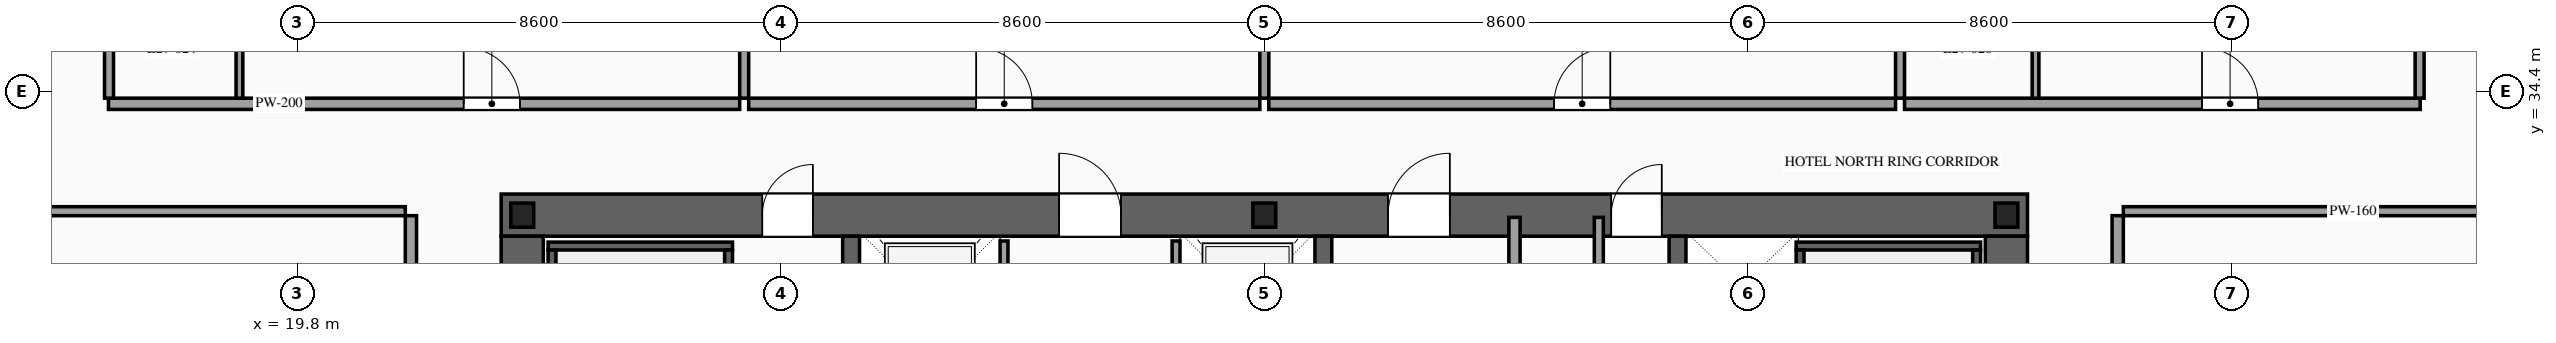
"""IFC4 building model, lengths in metres.
Left out: names, types, materials, properties, quantities, classifications, styles, units other than length and angle.
Written with IfcOpenShell. Run it as: python <this file> out.ifc"""

import sys

from ifc_helpers import new_model, si_unit, direction, frame, frame_2d, origin, origin_2d, place, context, subcontext, project, spatial, rectangle, i_section, extrude, source, transform, mapped, element, fill, save


model = new_model("IFC4")
c1 = context("Model", 3, precision=1e-05, world=origin(), true_north=direction((0.0, 1.0)))
c2 = subcontext(c1, "Body", "Model", "MODEL_VIEW")
j1 = project(units=[si_unit("LENGTHUNIT", "METRE"), si_unit("PLANEANGLEUNIT", "RADIAN")], contexts=[c1])
p1 = place(None, origin())
s1 = spatial("IfcSite", under=j1, at=p1, CompositionType="ELEMENT")
p2 = place(p1, origin())
s2 = spatial("IfcBuilding", under=s1, at=p2, CompositionType="ELEMENT")
p3 = place(p2, frame((0.0, 0.0, 104.6)))
s3 = spatial("IfcBuildingStorey", under=s2, at=p3, CompositionType="ELEMENT", Elevation=104.6)
p4 = place(p3, frame((23.425, 32.2, 0.0), z_axis=(0.0, 0.0, 1.0), x_axis=(1.0, 0.0, 0.0)))
e1 = element("IfcWall", 1, at=p4, inside=s3, PredefinedType="SHEAR", context=c2, shape_type="SweptSolid", body=[
    extrude(rectangle(XDim=27.15, YDim=0.75, at=frame_2d((13.575, 0.0))), origin(), (0.0, 0.0, 1.0), 3.6),
])
p5 = place(p4, frame((4.645, 0.0, 0.0)))
e2 = element("IfcOpeningElement", 2, at=p5, cuts=e1, PredefinedType="OPENING", context=c2, shape_type="SweptSolid", body=[
    extrude(rectangle(XDim=0.9, YDim=2.15, at=frame_2d((0.45, 1.075))), frame((0.0, 0.39, 0.0), z_axis=(0.0, -1.0, 0.0), x_axis=(1.0, 0.0, 0.0)), (0.0, 0.0, 1.0), 0.78),
])
p6 = place(p4, frame((9.925, 0.0, 0.0)))
e3 = element("IfcOpeningElement", 3, at=p6, cuts=e1, PredefinedType="OPENING", context=c2, shape_type="SweptSolid", body=[
    extrude(rectangle(XDim=1.1, YDim=2.2, at=frame_2d((0.55, 1.1))), frame((0.0, 0.39, 0.0), z_axis=(0.0, -1.0, 0.0), x_axis=(1.0, 0.0, 0.0)), (0.0, 0.0, 1.0), 0.78),
])
p7 = place(p4, frame((15.775, 0.0, 0.0)))
e4 = element("IfcOpeningElement", 4, at=p7, cuts=e1, PredefinedType="OPENING", context=c2, shape_type="SweptSolid", body=[
    extrude(rectangle(XDim=1.1, YDim=2.2, at=frame_2d((0.55, 1.1))), frame((0.0, 0.39, 0.0), z_axis=(0.0, -1.0, 0.0), x_axis=(1.0, 0.0, 0.0)), (0.0, 0.0, 1.0), 0.78),
])
p8 = place(p4, frame((19.745, 0.0, 0.0)))
e5 = element("IfcOpeningElement", 5, at=p8, cuts=e1, PredefinedType="OPENING", context=c2, shape_type="SweptSolid", body=[
    extrude(rectangle(XDim=0.9, YDim=2.15, at=frame_2d((0.45, 1.075))), frame((0.0, 0.39, 0.0), z_axis=(0.0, -1.0, 0.0), x_axis=(1.0, 0.0, 0.0)), (0.0, 0.0, 1.0), 0.78),
])
m1 = source(origin(), c2, "Body", "SweptSolid", [
    extrude(rectangle(XDim=12.05, YDim=0.75, at=frame_2d((6.025, 0.0))), origin(), (0.0, 0.0, 1.0), 3.6),
])
for number, where, z_axis, x_axis in (
    (6, (23.8, 19.775, 0.0), (0.0, 0.0, 1.0), (0.0, 1.0, 0.0)),
    (7, (50.2, 19.775, 0.0), (0.0, 0.0, 1.0), (0.0, 1.0, 0.0)),
):
    element("IfcWall", number, at=place(p3, frame(where, z_axis=z_axis, x_axis=x_axis)), inside=s3, PredefinedType="SHEAR", context=c2, shape_type="MappedRepresentation", body=[
        mapped(m1, transform((0.0, 0.0, 0.0), scale=1.0)),
    ])
m2 = source(origin(), c2, "Body", "SweptSolid", [
    extrude(rectangle(XDim=12.05, YDim=0.3, at=frame_2d((6.025, 0.0))), origin(), (0.0, 0.0, 1.0), 3.6),
])
for number, where, z_axis, x_axis in (
    (8, (29.65, 19.775, 0.0), (0.0, 0.0, 1.0), (0.0, 1.0, 0.0)),
    (9, (38.05, 19.775, 0.0), (0.0, 0.0, 1.0), (0.0, 1.0, 0.0)),
    (10, (44.35, 19.775, 0.0), (0.0, 0.0, 1.0), (0.0, 1.0, 0.0)),
):
    element("IfcWall", number, at=place(p3, frame(where, z_axis=z_axis, x_axis=x_axis)), inside=s3, PredefinedType="SOLIDWALL", context=c2, shape_type="MappedRepresentation", body=[
        mapped(m2, transform((0.0, 0.0, 0.0), scale=1.0)),
    ])
m3 = source(origin(), c2, "Body", "SweptSolid", [
    extrude(i_section(OverallWidth=0.407, OverallDepth=0.428, WebThickness=0.02, FlangeThickness=0.035, at=origin_2d()), origin(), (0.0, 0.0, 1.0), 3.6),
])
for number, where, z_axis, x_axis in (
    (11, (23.8, 32.2, 0.0), (0.0, 0.0, 1.0), (1.0, 0.0, 0.0)),
    (12, (37.0, 32.2, 0.0), (0.0, 0.0, 1.0), (1.0, 0.0, 0.0)),
    (13, (50.2, 32.2, 0.0), (0.0, 0.0, 1.0), (1.0, 0.0, 0.0)),
):
    element("IfcColumn", number, at=place(p3, frame(where, z_axis=z_axis, x_axis=x_axis)), inside=s3, PredefinedType="COLUMN", context=c2, shape_type="MappedRepresentation", body=[
        mapped(m3, transform((0.0, 0.0, 0.0), scale=1.0)),
    ])
p9 = place(p3, frame((32.37, 29.4, 0.0), z_axis=(0.0, 0.0, 1.0), x_axis=(0.0, 1.0, 0.0)))
e14 = element("IfcWall", 14, at=p9, inside=s3, PredefinedType="SOLIDWALL", context=c2, shape_type="SweptSolid", body=[
    extrude(rectangle(XDim=2.34, YDim=0.14, at=frame_2d((1.17, 0.0))), origin(), (0.0, 0.0, 1.0), 3.38),
])
p10 = place(p9, frame((0.62, 0.0, 0.0)))
e15 = element("IfcOpeningElement", 15, at=p10, cuts=e14, PredefinedType="OPENING", context=c2, shape_type="SweptSolid", body=[
    extrude(rectangle(XDim=1.1, YDim=2.2, at=frame_2d((0.55, 1.1))), frame((0.0, 0.085, 0.0), z_axis=(0.0, -1.0, 0.0), x_axis=(1.0, 0.0, 0.0)), (0.0, 0.0, 1.0), 0.17),
])
p11 = place(p3, frame((35.43, 29.4, 0.0), z_axis=(0.0, 0.0, 1.0), x_axis=(0.0, 1.0, 0.0)))
e16 = element("IfcWall", 16, at=p11, inside=s3, PredefinedType="SOLIDWALL", context=c2, shape_type="SweptSolid", body=[
    extrude(rectangle(XDim=2.34, YDim=0.14, at=frame_2d((1.17, 0.0))), origin(), (0.0, 0.0, 1.0), 3.38),
])
p12 = place(p11, frame((0.62, 0.0, 0.0)))
e17 = element("IfcOpeningElement", 17, at=p12, cuts=e16, PredefinedType="OPENING", context=c2, shape_type="SweptSolid", body=[
    extrude(rectangle(XDim=1.1, YDim=2.2, at=frame_2d((0.55, 1.1))), frame((0.0, 0.085, 0.0), z_axis=(0.0, -1.0, 0.0), x_axis=(1.0, 0.0, 0.0)), (0.0, 0.0, 1.0), 0.17),
])
m4 = source(origin(), c2, "Body", "SweptSolid", [
    extrude(rectangle(XDim=3.28, YDim=0.14, at=frame_2d((1.64, 0.0))), origin(), (0.0, 0.0, 1.0), 3.38),
])
p13 = place(p3, frame((24.26, 31.65, 0.0), z_axis=(0.0, 0.0, 1.0), x_axis=(1.0, 0.0, 0.0)))
e18 = element("IfcWall", 18, at=p13, inside=s3, PredefinedType="SOLIDWALL", context=c2, shape_type="MappedRepresentation", body=[
    mapped(m4, transform((0.0, 0.0, 0.0), scale=1.0)),
])
m5 = source(origin(), c2, "Body", "SweptSolid", [
    extrude(rectangle(XDim=8.94, YDim=0.14, at=frame_2d((4.47, 0.0))), origin(), (0.0, 0.0, 1.0), 3.38),
])
for number, where, z_axis, x_axis in (
    (19, (24.33, 22.64, 0.0), (0.0, 0.0, 1.0), (0.0, 1.0, 0.0)),
    (20, (27.47, 22.64, 0.0), (0.0, 0.0, 1.0), (0.0, 1.0, 0.0)),
):
    element("IfcWall", number, at=place(p3, frame(where, z_axis=z_axis, x_axis=x_axis)), inside=s3, PredefinedType="SOLIDWALL", context=c2, shape_type="MappedRepresentation", body=[
        mapped(m5, transform((0.0, 0.0, 0.0), scale=1.0)),
    ])
p14 = place(p3, frame((46.46, 31.65, 0.0), z_axis=(0.0, 0.0, 1.0), x_axis=(1.0, 0.0, 0.0)))
e21 = element("IfcWall", 21, at=p14, inside=s3, PredefinedType="SOLIDWALL", context=c2, shape_type="MappedRepresentation", body=[
    mapped(m4, transform((0.0, 0.0, 0.0), scale=1.0)),
])
for number, where, z_axis, x_axis in (
    (22, (46.53, 22.64, 0.0), (0.0, 0.0, 1.0), (0.0, 1.0, 0.0)),
    (23, (49.67, 22.64, 0.0), (0.0, 0.0, 1.0), (0.0, 1.0, 0.0)),
):
    element("IfcWall", number, at=place(p3, frame(where, z_axis=z_axis, x_axis=x_axis)), inside=s3, PredefinedType="SOLIDWALL", context=c2, shape_type="MappedRepresentation", body=[
        mapped(m5, transform((0.0, 0.0, 0.0), scale=1.0)),
    ])
m6 = source(origin(), c2, "Body", "SweptSolid", [
    extrude(rectangle(XDim=12.72, YDim=0.2, at=frame_2d((6.36, 0.0))), origin(), (0.0, 0.0, 1.0), 3.38),
])
p15 = place(p3, frame((41.45, 19.44, 0.0), z_axis=(0.0, 0.0, 1.0), x_axis=(0.0, 1.0, 0.0)))
e24 = element("IfcWall", 24, at=p15, inside=s3, PredefinedType="PARTITIONING", context=c2, shape_type="MappedRepresentation", body=[
    mapped(m6, transform((0.0, 0.0, 0.0), scale=1.0)),
])
m7 = source(origin(), c2, "Body", "SweptSolid", [
    extrude(rectangle(XDim=10.72, YDim=0.16, at=frame_2d((5.36, 0.0))), origin(), (0.0, 0.0, 1.0), 3.38),
])
p16 = place(p3, frame((42.95, 21.44, 0.0), z_axis=(0.0, 0.0, 1.0), x_axis=(0.0, 1.0, 0.0)))
e25 = element("IfcWall", 25, at=p16, inside=s3, PredefinedType="PARTITIONING", context=c2, shape_type="MappedRepresentation", body=[
    mapped(m7, transform((0.0, 0.0, 0.0), scale=1.0)),
])
p17 = place(p3, frame((16.44, 34.18, 0.0), z_axis=(0.0, 0.0, 1.0), x_axis=(1.0, 0.0, 0.0)))
e26 = element("IfcWall", 26, at=p17, inside=s3, PredefinedType="PARTITIONING", context=c2, shape_type="SweptSolid", body=[
    extrude(rectangle(XDim=11.228, YDim=0.2, at=frame_2d((5.614, 0.0))), origin(), (0.0, 0.0, 1.0), 3.38),
])
p18 = place(p17, frame((6.319, 0.0, 0.0)))
e27 = element("IfcOpeningElement", 27, at=p18, cuts=e26, PredefinedType="OPENING", context=c2, shape_type="SweptSolid", body=[
    extrude(rectangle(XDim=1.0, YDim=2.2, at=frame_2d((0.5, 1.1))), frame((0.0, 0.115, 0.0), z_axis=(0.0, -1.0, 0.0), x_axis=(1.0, 0.0, 0.0)), (0.0, 0.0, 1.0), 0.23),
])
m8 = source(origin(), c2, "Body", "SweptSolid", [
    extrude(rectangle(XDim=14.97, YDim=0.16, at=frame_2d((7.485, 0.0))), origin(), (0.0, 0.0, 1.0), 3.38),
])
p19 = place(p3, frame((27.748, 34.28, 0.0), z_axis=(0.0, 0.0, 1.0), x_axis=(0.0, 1.0, 0.0)))
e28 = element("IfcWall", 28, at=p19, inside=s3, PredefinedType="PARTITIONING", context=c2, shape_type="MappedRepresentation", body=[
    mapped(m8, transform((0.0, 0.0, 0.0), scale=1.0)),
])
m9 = source(origin(), c2, "Body", "SweptSolid", [
    extrude(rectangle(XDim=2.42, YDim=0.12, at=frame_2d((1.21, 0.0))), origin(), (0.0, 0.0, 1.0), 3.38),
])
p20 = place(p3, frame((18.77, 34.28, 0.0), z_axis=(0.0, 0.0, 1.0), x_axis=(0.0, 1.0, 0.0)))
e29 = element("IfcWall", 29, at=p20, inside=s3, PredefinedType="PARTITIONING", context=c2, shape_type="MappedRepresentation", body=[
    mapped(m9, transform((0.0, 0.0, 0.0), scale=1.0)),
])
p21 = place(p3, frame((27.828, 34.18, 0.0), z_axis=(0.0, 0.0, 1.0), x_axis=(1.0, 0.0, 0.0)))
e30 = element("IfcWall", 30, at=p21, inside=s3, PredefinedType="PARTITIONING", context=c2, shape_type="SweptSolid", body=[
    extrude(rectangle(XDim=9.092, YDim=0.2, at=frame_2d((4.546, 0.0))), origin(), (0.0, 0.0, 1.0), 3.38),
])
p22 = place(p21, frame((4.046, 0.0, 0.0)))
e31 = element("IfcOpeningElement", 31, at=p22, cuts=e30, PredefinedType="OPENING", context=c2, shape_type="SweptSolid", body=[
    extrude(rectangle(XDim=1.0, YDim=2.2, at=frame_2d((0.5, 1.1))), frame((0.0, 0.115, 0.0), z_axis=(0.0, -1.0, 0.0), x_axis=(1.0, 0.0, 0.0)), (0.0, 0.0, 1.0), 0.23),
])
m10 = source(origin(), c2, "Body", "SweptSolid", [
    extrude(rectangle(XDim=14.97, YDim=0.16, at=frame_2d((7.485, 0.0))), origin(), (0.0, 0.0, 1.0), 2.675),
])
p23 = place(p3, frame((37.0, 34.28, 0.0), z_axis=(0.0, 0.0, 1.0), x_axis=(0.0, 1.0, 0.0)))
e32 = element("IfcWall", 32, at=p23, inside=s3, PredefinedType="PARTITIONING", context=c2, shape_type="MappedRepresentation", body=[
    mapped(m10, transform((0.0, 0.0, 0.0), scale=1.0)),
])
p24 = place(p3, frame((37.08, 34.18, 0.0), z_axis=(0.0, 0.0, 1.0), x_axis=(1.0, 0.0, 0.0)))
e33 = element("IfcWall", 33, at=p24, inside=s3, PredefinedType="PARTITIONING", context=c2, shape_type="SweptSolid", body=[
    extrude(rectangle(XDim=11.148, YDim=0.2, at=frame_2d((5.574, 0.0))), origin(), (0.0, 0.0, 1.0), 3.38),
])
p25 = place(p24, frame((5.074, 0.0, 0.0)))
e34 = element("IfcOpeningElement", 34, at=p25, cuts=e33, PredefinedType="OPENING", context=c2, shape_type="SweptSolid", body=[
    extrude(rectangle(XDim=1.0, YDim=2.2, at=frame_2d((0.5, 1.1))), frame((0.0, 0.115, 0.0), z_axis=(0.0, -1.0, 0.0), x_axis=(1.0, 0.0, 0.0)), (0.0, 0.0, 1.0), 0.23),
])
p26 = place(p3, frame((48.308, 34.28, 0.0), z_axis=(0.0, 0.0, 1.0), x_axis=(0.0, 1.0, 0.0)))
e35 = element("IfcWall", 35, at=p26, inside=s3, PredefinedType="PARTITIONING", context=c2, shape_type="MappedRepresentation", body=[
    mapped(m8, transform((0.0, 0.0, 0.0), scale=1.0)),
])
p27 = place(p3, frame((48.388, 34.18, 0.0), z_axis=(0.0, 0.0, 1.0), x_axis=(1.0, 0.0, 0.0)))
e36 = element("IfcWall", 36, at=p27, inside=s3, PredefinedType="PARTITIONING", context=c2, shape_type="SweptSolid", body=[
    extrude(rectangle(XDim=9.172, YDim=0.2, at=frame_2d((4.586, 0.0))), origin(), (0.0, 0.0, 1.0), 3.38),
])
p28 = place(p27, frame((5.291, 0.0, 0.0)))
e37 = element("IfcOpeningElement", 37, at=p28, cuts=e36, PredefinedType="OPENING", context=c2, shape_type="SweptSolid", body=[
    extrude(rectangle(XDim=1.0, YDim=2.2, at=frame_2d((0.5, 1.1))), frame((0.0, 0.115, 0.0), z_axis=(0.0, -1.0, 0.0), x_axis=(1.0, 0.0, 0.0)), (0.0, 0.0, 1.0), 0.23),
])
m11 = source(origin(), c2, "Body", "SweptSolid", [
    extrude(rectangle(XDim=14.82, YDim=0.16, at=frame_2d((7.41, 0.0))), origin(), (0.0, 0.0, 1.0), 3.38),
])
for number, where, z_axis, x_axis in (
    (38, (16.45, 34.28, 0.0), (0.0, 0.0, 1.0), (0.0, 1.0, 0.0)),
    (39, (57.55, 34.28, 0.0), (0.0, 0.0, 1.0), (0.0, 1.0, 0.0)),
):
    element("IfcWall", number, at=place(p3, frame(where, z_axis=z_axis, x_axis=x_axis)), inside=s3, PredefinedType="PARTITIONING", context=c2, shape_type="MappedRepresentation", body=[
        mapped(m11, transform((0.0, 0.0, 0.0), scale=1.0)),
    ])
p29 = place(p3, frame((50.718, 34.28, 0.0), z_axis=(0.0, 0.0, 1.0), x_axis=(0.0, 1.0, 0.0)))
e40 = element("IfcWall", 40, at=p29, inside=s3, PredefinedType="PARTITIONING", context=c2, shape_type="MappedRepresentation", body=[
    mapped(m9, transform((0.0, 0.0, 0.0), scale=1.0)),
])
p30 = place(p3, frame((21.82, 19.41, 0.0), z_axis=(0.0, 0.0, 1.0), x_axis=(0.0, 1.0, 0.0)))
e41 = element("IfcWall", 41, at=p30, inside=s3, PredefinedType="PARTITIONING", context=c2, shape_type="SweptSolid", body=[
    extrude(rectangle(XDim=12.78, YDim=0.2, at=frame_2d((6.39, 0.0))), origin(), (0.0, 0.0, 1.0), 3.38),
])
p31 = place(p30, frame((5.89, 0.0, 0.0)))
e42 = element("IfcOpeningElement", 42, at=p31, cuts=e41, PredefinedType="OPENING", context=c2, shape_type="SweptSolid", body=[
    extrude(rectangle(XDim=1.0, YDim=2.2, at=frame_2d((0.5, 1.1))), frame((0.0, 0.115, 0.0), z_axis=(0.0, -1.0, 0.0), x_axis=(1.0, 0.0, 0.0)), (0.0, 0.0, 1.0), 0.23),
])
m12 = source(origin(), c2, "Body", "SweptSolid", [
    extrude(rectangle(XDim=8.17, YDim=0.16, at=frame_2d((4.085, 0.0))), origin(), (0.0, 0.0, 1.0), 2.875),
])
p32 = place(p3, frame((13.55, 32.27, 0.0), z_axis=(0.0, 0.0, 1.0), x_axis=(1.0, 0.0, 0.0)))
e43 = element("IfcWall", 43, at=p32, inside=s3, PredefinedType="PARTITIONING", context=c2, shape_type="MappedRepresentation", body=[
    mapped(m12, transform((0.0, 0.0, 0.0), scale=1.0)),
])
p33 = place(p3, frame((52.18, 19.41, 0.0), z_axis=(0.0, 0.0, 1.0), x_axis=(0.0, 1.0, 0.0)))
e44 = element("IfcWall", 44, at=p33, inside=s3, PredefinedType="PARTITIONING", context=c2, shape_type="SweptSolid", body=[
    extrude(rectangle(XDim=12.78, YDim=0.2, at=frame_2d((6.39, 0.0))), origin(), (0.0, 0.0, 1.0), 3.38),
])
p34 = place(p33, frame((5.89, 0.0, 0.0)))
e45 = element("IfcOpeningElement", 45, at=p34, cuts=e44, PredefinedType="OPENING", context=c2, shape_type="SweptSolid", body=[
    extrude(rectangle(XDim=1.0, YDim=2.2, at=frame_2d((0.5, 1.1))), frame((0.0, 0.115, 0.0), z_axis=(0.0, -1.0, 0.0), x_axis=(1.0, 0.0, 0.0)), (0.0, 0.0, 1.0), 0.23),
])
p35 = place(p3, frame((52.28, 32.27, 0.0), z_axis=(0.0, 0.0, 1.0), x_axis=(1.0, 0.0, 0.0)))
e46 = element("IfcWall", 46, at=p35, inside=s3, PredefinedType="PARTITIONING", context=c2, shape_type="MappedRepresentation", body=[
    mapped(m12, transform((0.0, 0.0, 0.0), scale=1.0)),
])
m13 = source(origin(), c2, "Body", "SweptSolid", [
    extrude(rectangle(XDim=0.9, YDim=2.15, at=frame_2d((0.45, 1.075))), frame((0.0, 0.025, 0.0), z_axis=(0.0, -1.0, 0.0), x_axis=(1.0, 0.0, 0.0)), (0.0, 0.0, 1.0), 0.05),
])
p36 = place(p5, origin())
e47 = element("IfcDoor", 47, at=p36, inside=s3, OperationType="SINGLE_SWING_RIGHT", PredefinedType="DOOR", context=c2, shape_type="MappedRepresentation", body=[
    mapped(m13, transform((0.0, 0.0, 0.0), scale=1.0)),
])
fill(e2, e47)
m14 = source(origin(), c2, "Body", "SweptSolid", [
    extrude(rectangle(XDim=1.1, YDim=2.2, at=frame_2d((0.55, 1.1))), frame((0.0, 0.025, 0.0), z_axis=(0.0, -1.0, 0.0), x_axis=(1.0, 0.0, 0.0)), (0.0, 0.0, 1.0), 0.05),
])
p37 = place(p6, origin())
e48 = element("IfcDoor", 48, at=p37, inside=s3, OperationType="SINGLE_SWING_LEFT", PredefinedType="DOOR", context=c2, shape_type="MappedRepresentation", body=[
    mapped(m14, transform((0.0, 0.0, 0.0), scale=1.0)),
])
fill(e3, e48)
p38 = place(p7, origin())
e49 = element("IfcDoor", 49, at=p38, inside=s3, OperationType="SINGLE_SWING_RIGHT", PredefinedType="DOOR", context=c2, shape_type="MappedRepresentation", body=[
    mapped(m14, transform((0.0, 0.0, 0.0), scale=1.0)),
])
fill(e4, e49)
p39 = place(p8, origin())
e50 = element("IfcDoor", 50, at=p39, inside=s3, OperationType="SINGLE_SWING_RIGHT", PredefinedType="DOOR", context=c2, shape_type="MappedRepresentation", body=[
    mapped(m13, transform((0.0, 0.0, 0.0), scale=1.0)),
])
fill(e5, e50)
m15 = source(origin(), c2, "Body", "SweptSolid", [
    extrude(rectangle(XDim=1.0, YDim=2.2, at=frame_2d((0.5, 1.1))), frame((0.0, 0.025, 0.0), z_axis=(0.0, -1.0, 0.0), x_axis=(1.0, 0.0, 0.0)), (0.0, 0.0, 1.0), 0.05),
])
p40 = place(p18, origin())
e51 = element("IfcDoor", 51, at=p40, inside=s3, OperationType="SINGLE_SWING_LEFT", PredefinedType="DOOR", context=c2, shape_type="MappedRepresentation", body=[
    mapped(m15, transform((0.0, 0.0, 0.0), scale=1.0)),
])
fill(e27, e51)
p41 = place(p22, origin())
e52 = element("IfcDoor", 52, at=p41, inside=s3, OperationType="SINGLE_SWING_LEFT", PredefinedType="DOOR", context=c2, shape_type="MappedRepresentation", body=[
    mapped(m15, transform((0.0, 0.0, 0.0), scale=1.0)),
])
fill(e31, e52)
p42 = place(p25, origin())
e53 = element("IfcDoor", 53, at=p42, inside=s3, OperationType="SINGLE_SWING_RIGHT", PredefinedType="DOOR", context=c2, shape_type="MappedRepresentation", body=[
    mapped(m15, transform((0.0, 0.0, 0.0), scale=1.0)),
])
fill(e34, e53)
p43 = place(p28, origin())
e54 = element("IfcDoor", 54, at=p43, inside=s3, OperationType="SINGLE_SWING_LEFT", PredefinedType="DOOR", context=c2, shape_type="MappedRepresentation", body=[
    mapped(m15, transform((0.0, 0.0, 0.0), scale=1.0)),
])
fill(e37, e54)
save(model, sys.argv[1])
